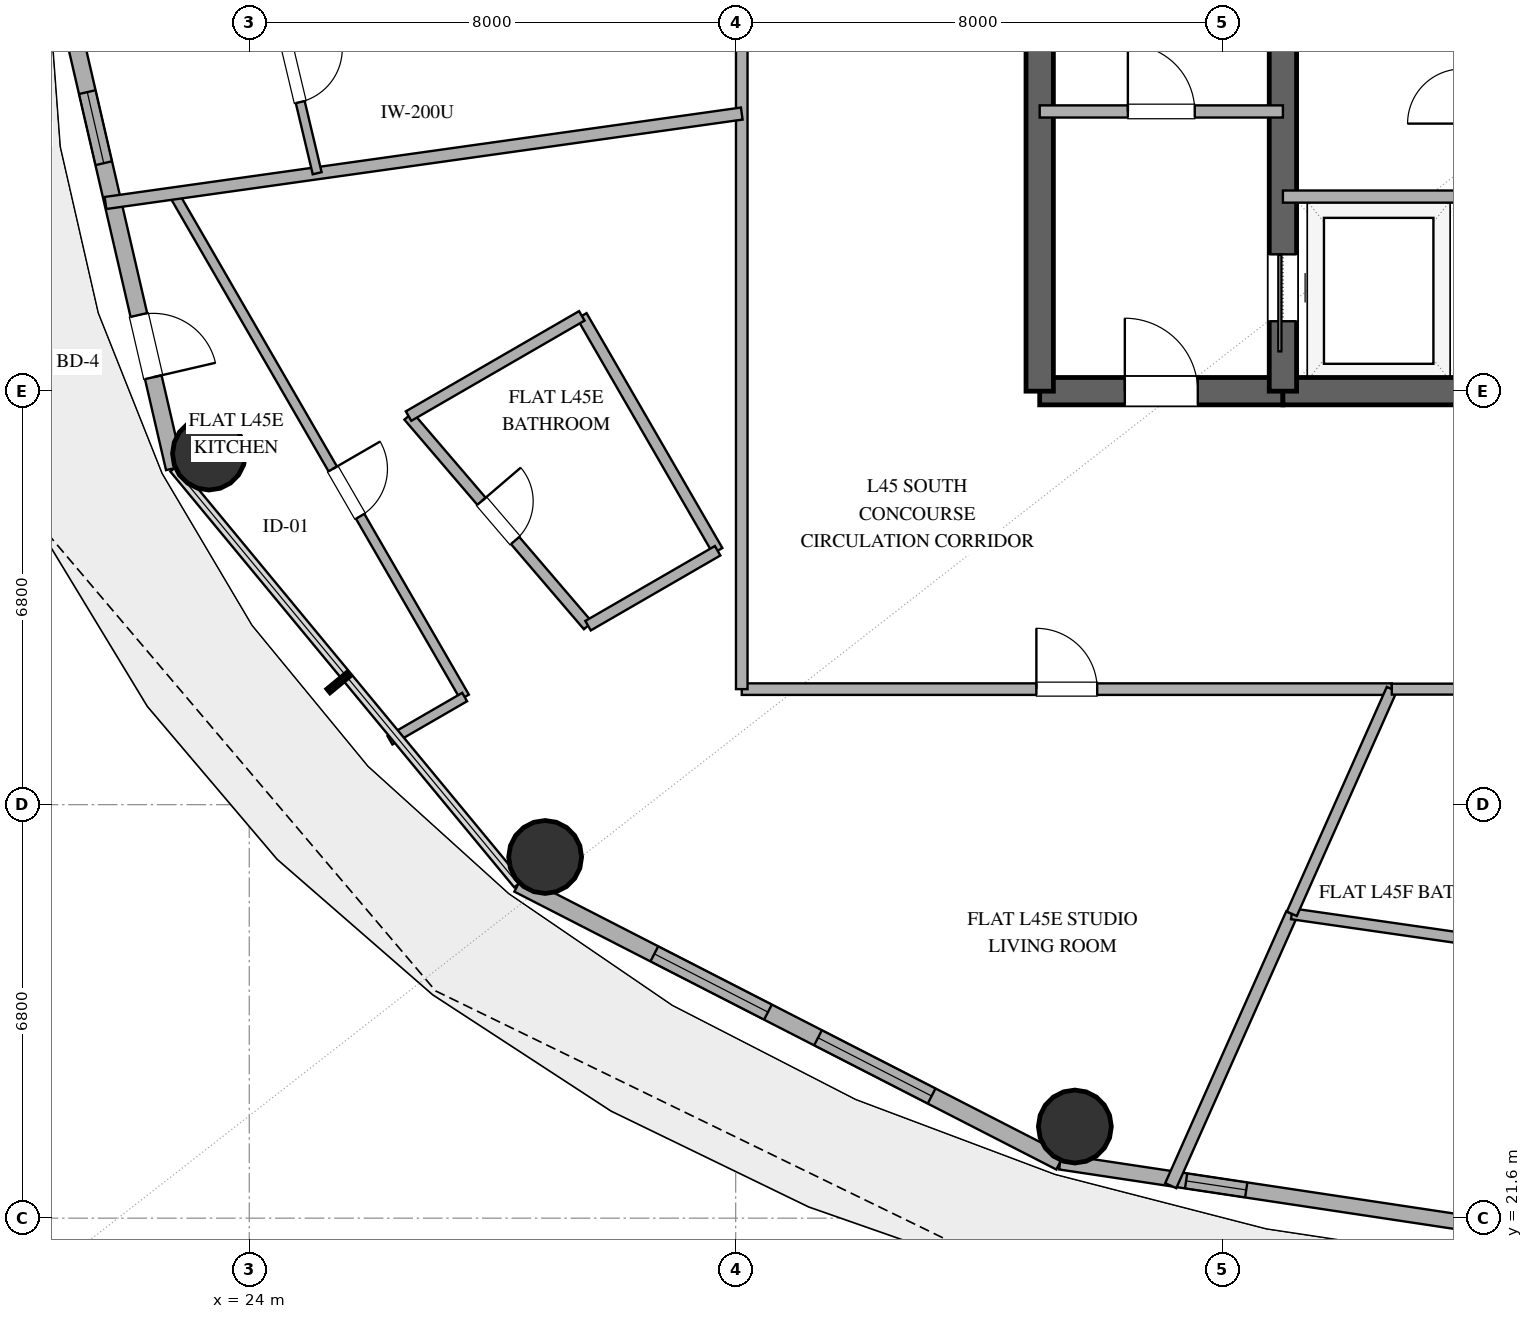
"""IFC4 building model, lengths in metres.
Left out: names, types, materials, properties, quantities, classifications, styles, units other than length and angle.
Written with IfcOpenShell. Run it as: python <this file> out.ifc"""

import sys

from ifc_helpers import new_model, si_unit, direction, frame, frame_2d, origin, origin_2d, place, context, subcontext, project, spatial, rectangle, hollow_circle, extrude, element, fill, save


model = new_model("IFC4")
c1 = context("Model", 3, precision=1e-05, world=origin(), true_north=direction((0.0, 1.0)))
c2 = subcontext(c1, "Body", "Model", "MODEL_VIEW")
j1 = project(units=[si_unit("LENGTHUNIT", "METRE"), si_unit("PLANEANGLEUNIT", "RADIAN")], contexts=[c1])
p1 = place(None, origin())
s1 = spatial("IfcSite", under=j1, at=p1, CompositionType="ELEMENT")
p2 = place(p1, origin())
s2 = spatial("IfcBuilding", under=s1, at=p2, CompositionType="ELEMENT")
p3 = place(p2, frame((0.0, 0.0, 179.4)))
s3 = spatial("IfcBuildingStorey", under=s2, at=p3, CompositionType="ELEMENT", Elevation=179.4)
p4 = place(p3, frame((37.0, 35.2, 0.0), z_axis=(0.0, 0.0, 1.0), x_axis=(1.0, 0.0, 0.0)))
e1 = element("IfcWall", 1, at=p4, inside=s3, PredefinedType="SHEAR", context=c2, shape_type="SweptSolid", body=[
    extrude(rectangle(XDim=4.0, YDim=0.45, at=frame_2d((2.0, 0.0))), origin(), (0.0, 0.0, 1.0), 3.38),
])
p5 = place(p4, frame((1.4, 0.0, 0.0)))
e2 = element("IfcOpeningElement", 2, at=p5, cuts=e1, PredefinedType="OPENING", context=c2, shape_type="SweptSolid", body=[
    extrude(rectangle(XDim=1.2, YDim=2.15, at=frame_2d((0.6, 1.075))), frame((0.0, 0.235, 0.0), z_axis=(0.0, -1.0, 0.0), x_axis=(1.0, 0.0, 0.0)), (0.0, 0.0, 1.0), 0.47),
])
p6 = place(p3, frame((41.0, 35.2, 0.0), z_axis=(0.0, 0.0, 1.0), x_axis=(1.0, 0.0, 0.0)))
e3 = element("IfcWall", 3, at=p6, inside=s3, PredefinedType="SHEAR", context=c2, shape_type="SweptSolid", body=[
    extrude(rectangle(XDim=14.0, YDim=0.45, at=frame_2d((7.0, 0.0))), origin(), (0.0, 0.0, 1.0), 3.38),
])
p7 = place(p6, frame((6.1, 0.0, 0.0)))
e4 = element("IfcOpeningElement", 4, at=p7, cuts=e3, PredefinedType="OPENING", context=c2, shape_type="SweptSolid", body=[
    extrude(rectangle(XDim=1.8, YDim=2.25, at=frame_2d((0.9, 1.125))), frame((0.0, 0.235, 0.0), z_axis=(0.0, -1.0, 0.0), x_axis=(1.0, 0.0, 0.0)), (0.0, 0.0, 1.0), 0.47),
])
p8 = place(p3, frame((37.0, 35.2, 0.0), z_axis=(0.0, 0.0, 1.0), x_axis=(0.0, 1.0, 0.0)))
e5 = element("IfcWall", 5, at=p8, inside=s3, PredefinedType="SHEAR", context=c2, shape_type="SweptSolid", body=[
    extrude(rectangle(XDim=13.6, YDim=0.45, at=frame_2d((6.8, 0.0))), origin(), (0.0, 0.0, 1.0), 3.38),
])
p9 = place(p3, frame((41.0, 35.2, 0.0), z_axis=(0.0, 0.0, 1.0), x_axis=(0.0, 1.0, 0.0)))
e6 = element("IfcWall", 6, at=p9, inside=s3, PredefinedType="SHEAR", context=c2, shape_type="SweptSolid", body=[
    extrude(rectangle(XDim=13.6, YDim=0.45, at=frame_2d((6.8, 0.0))), origin(), (0.0, 0.0, 1.0), 3.38),
])
p10 = place(p9, frame((1.15, 0.0, 0.0)))
e7 = element("IfcOpeningElement", 7, at=p10, cuts=e6, PredefinedType="OPENING", context=c2, shape_type="SweptSolid", body=[
    extrude(rectangle(XDim=1.1, YDim=2.2, at=frame_2d((0.55, 1.1))), frame((0.0, 0.235, 0.0), z_axis=(0.0, -1.0, 0.0), x_axis=(1.0, 0.0, 0.0)), (0.0, 0.0, 1.0), 0.47),
])
for number, where, z_axis, x_axis in (
    (8, (23.338, 34.174, 0.0), (0.0, 0.0, 1.0), (1.0, 0.0, 0.0)),
    (9, (28.866, 27.54, 0.0), (0.0, 0.0, 1.0), (1.0, 0.0, 0.0)),
    (10, (37.578, 23.107, 0.0), (0.0, 0.0, 1.0), (1.0, 0.0, 0.0)),
):
    element("IfcColumn", number, at=place(p3, frame(where, z_axis=z_axis, x_axis=x_axis)), inside=s3, PredefinedType="COLUMN", context=c2, shape_type="SweptSolid", body=[
        extrude(hollow_circle(Radius=0.6, WallThickness=0.032, at=origin_2d()), origin(), (0.0, 0.0, 1.0), 3.38),
    ])
p11 = place(p3, frame((20.901, 42.0, 0.0), z_axis=(0.0, 0.0, 1.0), x_axis=(0.225473184558, -0.974249374157, 0.0)))
e11 = element("IfcWall", 11, at=p11, inside=s3, PredefinedType="SOLIDWALL", context=c2, shape_type="SweptSolid", body=[
    extrude(rectangle(XDim=8.28, YDim=0.28, at=frame_2d((4.14, 0.0))), origin(), (0.0, 0.0, 1.0), 3.38),
])
p12 = place(p11, frame((1.932, 0.0, 0.85)))
e12 = element("IfcOpeningElement", 12, at=p12, cuts=e11, PredefinedType="OPENING", context=c2, shape_type="SweptSolid", body=[
    extrude(rectangle(XDim=1.2, YDim=1.8, at=frame_2d((0.6, 0.9))), frame((0.0, 0.15, 0.0), z_axis=(0.0, -1.0, 0.0), x_axis=(1.0, 0.0, 0.0)), (0.0, 0.0, 1.0), 0.3),
])
p13 = place(p11, frame((5.694, 0.0, 0.0)))
e13 = element("IfcOpeningElement", 13, at=p13, cuts=e11, PredefinedType="OPENING", context=c2, shape_type="SweptSolid", body=[
    extrude(rectangle(XDim=1.05, YDim=2.2, at=frame_2d((0.525, 1.1))), frame((0.0, 0.15, 0.0), z_axis=(0.0, -1.0, 0.0), x_axis=(1.0, 0.0, 0.0)), (0.0, 0.0, 1.0), 0.3),
])
p14 = place(p3, frame((28.424, 27.094, 0.0), z_axis=(0.0, 0.0, 1.0), x_axis=(0.889872523182, -0.456209263919, 0.0)))
e14 = element("IfcWall", 14, at=p14, inside=s3, PredefinedType="SOLIDWALL", context=c2, shape_type="SweptSolid", body=[
    extrude(rectangle(XDim=10.016, YDim=0.28, at=frame_2d((5.008, 0.0))), origin(), (0.0, 0.0, 1.0), 3.38),
])
p15 = place(p14, frame((2.515, 0.0, 0.85)))
e15 = element("IfcOpeningElement", 15, at=p15, cuts=e14, PredefinedType="OPENING", context=c2, shape_type="SweptSolid", body=[
    extrude(rectangle(XDim=2.1, YDim=2.2, at=frame_2d((1.05, 1.1))), frame((0.0, 0.15, 0.0), z_axis=(0.0, -1.0, 0.0), x_axis=(1.0, 0.0, 0.0)), (0.0, 0.0, 1.0), 0.3),
])
p16 = place(p14, frame((5.54, 0.0, 0.85)))
e16 = element("IfcOpeningElement", 16, at=p16, cuts=e14, PredefinedType="OPENING", context=c2, shape_type="SweptSolid", body=[
    extrude(rectangle(XDim=2.1, YDim=2.2, at=frame_2d((1.05, 1.1))), frame((0.0, 0.15, 0.0), z_axis=(0.0, -1.0, 0.0), x_axis=(1.0, 0.0, 0.0)), (0.0, 0.0, 1.0), 0.3),
])
p17 = place(p3, frame((37.337, 22.525, 0.0), z_axis=(0.0, 0.0, 1.0), x_axis=(0.988863993413, -0.148822049884, 0.0)))
e17 = element("IfcWall", 17, at=p17, inside=s3, PredefinedType="SOLIDWALL", context=c2, shape_type="SweptSolid", body=[
    extrude(rectangle(XDim=10.783, YDim=0.25, at=frame_2d((5.392, 0.0))), origin(), (0.0, 0.0, 1.0), 3.38),
])
p18 = place(p17, frame((2.094, 0.0, 0.35)))
e18 = element("IfcOpeningElement", 18, at=p18, cuts=e17, PredefinedType="OPENING", context=c2, shape_type="SweptSolid", body=[
    extrude(rectangle(XDim=1.0, YDim=1.05, at=frame_2d((0.5, 0.525))), frame((0.0, 0.135, 0.0), z_axis=(0.0, -1.0, 0.0), x_axis=(1.0, 0.0, 0.0)), (0.0, 0.0, 1.0), 0.27),
])
p19 = place(p3, frame((37.0, 39.8, 0.0), z_axis=(0.0, 0.0, 1.0), x_axis=(1.0, 0.0, 0.0)))
e19 = element("IfcWall", 19, at=p19, inside=s3, PredefinedType="SOLIDWALL", context=c2, shape_type="SweptSolid", body=[
    extrude(rectangle(XDim=4.0, YDim=0.2, at=frame_2d((2.0, 0.0))), origin(), (0.0, 0.0, 1.0), 2.74),
])
p20 = place(p19, frame((1.45, 0.0, 0.0)))
e20 = element("IfcOpeningElement", 20, at=p20, cuts=e19, PredefinedType="OPENING", context=c2, shape_type="SweptSolid", body=[
    extrude(rectangle(XDim=1.1, YDim=2.15, at=frame_2d((0.55, 1.075))), frame((0.0, 0.11, 0.0), z_axis=(0.0, -1.0, 0.0), x_axis=(1.0, 0.0, 0.0)), (0.0, 0.0, 1.0), 0.22),
])
p21 = place(p3, frame((41.0, 38.4, 0.0), z_axis=(0.0, 0.0, 1.0), x_axis=(1.0, 0.0, 0.0)))
e21 = element("IfcWall", 21, at=p21, inside=s3, PredefinedType="SOLIDWALL", context=c2, shape_type="SweptSolid", body=[
    extrude(rectangle(XDim=2.95, YDim=0.2, at=frame_2d((1.475, 0.0))), origin(), (0.0, 0.0, 1.0), 2.74),
])
p22 = place(p3, frame((32.1, 30.3, 0.0), z_axis=(0.0, 0.0, 1.0), x_axis=(1.0, 0.0, 0.0)))
e22 = element("IfcWall", 22, at=p22, inside=s3, PredefinedType="PARTITIONING", context=c2, shape_type="SweptSolid", body=[
    extrude(rectangle(XDim=10.691, YDim=0.19, at=frame_2d((5.345, 0.0))), origin(), (0.0, 0.0, 1.0), 2.74),
])
p23 = place(p22, frame((4.845, 0.0, 0.0)))
e23 = element("IfcOpeningElement", 23, at=p23, cuts=e22, PredefinedType="OPENING", context=c2, shape_type="SweptSolid", body=[
    extrude(rectangle(XDim=1.0, YDim=2.2, at=frame_2d((0.5, 1.1))), frame((0.0, 0.105, 0.0), z_axis=(0.0, -1.0, 0.0), x_axis=(1.0, 0.0, 0.0)), (0.0, 0.0, 1.0), 0.21),
])
p24 = place(p3, frame((22.753, 38.452, 0.0), z_axis=(0.0, 0.0, 1.0), x_axis=(0.500584533727, -0.865687659952, 0.0)))
e24 = element("IfcWall", 24, at=p24, inside=s3, PredefinedType="PLUMBINGWALL", context=c2, shape_type="SweptSolid", body=[
    extrude(rectangle(XDim=9.567, YDim=0.16, at=frame_2d((4.783, 0.0))), origin(), (0.0, 0.0, 1.0), 2.74),
])
p25 = place(p24, frame((5.233, 0.0, 0.0)))
e25 = element("IfcOpeningElement", 25, at=p25, cuts=e24, PredefinedType="OPENING", context=c2, shape_type="SweptSolid", body=[
    extrude(rectangle(XDim=0.9, YDim=2.1, at=frame_2d((0.45, 1.05))), frame((0.0, 0.09, 0.0), z_axis=(0.0, -1.0, 0.0), x_axis=(1.0, 0.0, 0.0)), (0.0, 0.0, 1.0), 0.18),
])
p26 = place(p3, frame((32.1, 46.593, 0.0), z_axis=(0.0, 0.0, 1.0), x_axis=(0.0, -1.0, 0.0)))
e26 = element("IfcWall", 26, at=p26, inside=s3, PredefinedType="PARTITIONING", context=c2, shape_type="SweptSolid", body=[
    extrude(rectangle(XDim=16.292, YDim=0.19, at=frame_2d((8.146, 0.0))), origin(), (0.0, 0.0, 1.0), 2.74),
])
p27 = place(p3, frame((21.635, 38.295, 0.0), z_axis=(0.0, 0.0, 1.0), x_axis=(0.990268074466, 0.139173060229, 0.0)))
e27 = element("IfcWall", 27, at=p27, inside=s3, PredefinedType="PARTITIONING", context=c2, shape_type="SweptSolid", body=[
    extrude(rectangle(XDim=10.567, YDim=0.2, at=frame_2d((5.284, 0.0))), origin(), (0.0, 0.0, 1.0), 2.74),
])
p28 = place(p3, frame((39.155, 22.134, 0.0), z_axis=(0.0, 0.0, 1.0), x_axis=(0.406740050792, 0.913543940422, 0.0)))
e28 = element("IfcWall", 28, at=p28, inside=s3, PredefinedType="PARTITIONING", context=c2, shape_type="SweptSolid", body=[
    extrude(rectangle(XDim=4.894, YDim=0.2, at=frame_2d((2.447, 0.0))), origin(), (0.0, 0.0, 1.0), 2.74),
])
p29 = place(p3, frame((26.62, 34.79, 0.0), z_axis=(0.0, 0.0, 1.0), x_axis=(0.650507788654, -0.759499583213, 0.0)))
e29 = element("IfcWall", 29, at=p29, inside=s3, PredefinedType="PLUMBINGWALL", context=c2, shape_type="SweptSolid", body=[
    extrude(rectangle(XDim=4.538, YDim=0.18, at=frame_2d((2.269, 0.0))), origin(), (0.0, 0.0, 1.0), 2.74),
])
p30 = place(p29, frame((1.844, 0.0, 0.0)))
e30 = element("IfcOpeningElement", 30, at=p30, cuts=e29, PredefinedType="OPENING", context=c2, shape_type="SweptSolid", body=[
    extrude(rectangle(XDim=0.85, YDim=2.1, at=frame_2d((0.425, 1.05))), frame((0.0, 0.1, 0.0), z_axis=(0.0, -1.0, 0.0), x_axis=(1.0, 0.0, 0.0)), (0.0, 0.0, 1.0), 0.2),
])
p31 = place(p3, frame((31.703, 32.576, 0.0), z_axis=(0.0, 0.0, 1.0), x_axis=(-0.500604830324, 0.865675923112, 0.0)))
e31 = element("IfcWall", 31, at=p31, inside=s3, PredefinedType="PLUMBINGWALL", context=c2, shape_type="SweptSolid", body=[
    extrude(rectangle(XDim=4.462, YDim=0.18, at=frame_2d((2.231, 0.0))), origin(), (0.0, 0.0, 1.0), 2.74),
])
p32 = place(p3, frame((45.366, 25.999, 0.0), z_axis=(0.0, 0.0, 1.0), x_axis=(-0.98982427769, 0.14229511339, 0.0)))
e32 = element("IfcWall", 32, at=p32, inside=s3, PredefinedType="PLUMBINGWALL", context=c2, shape_type="SweptSolid", body=[
    extrude(rectangle(XDim=4.264, YDim=0.18, at=frame_2d((2.132, 0.0))), origin(), (0.0, 0.0, 1.0), 2.74),
])
p33 = place(p3, frame((41.146, 26.605, 0.0), z_axis=(0.0, 0.0, 1.0), x_axis=(0.406732062562, 0.913547497005, 0.0)))
e33 = element("IfcWall", 33, at=p33, inside=s3, PredefinedType="PLUMBINGWALL", context=c2, shape_type="SweptSolid", body=[
    extrude(rectangle(XDim=4.044, YDim=0.18, at=frame_2d((2.022, 0.0))), origin(), (0.0, 0.0, 1.0), 2.74),
])
p34 = place(p3, frame((24.351, 42.0, 0.0), z_axis=(0.0, 0.0, 1.0), x_axis=(0.231590575549, -0.972813345569, 0.0)))
e34 = element("IfcWall", 34, at=p34, inside=s3, PredefinedType="PARTITIONING", context=c2, shape_type="SweptSolid", body=[
    extrude(rectangle(XDim=3.306, YDim=0.15, at=frame_2d((1.653, 0.0))), origin(), (0.0, 0.0, 1.0), 2.74),
])
p35 = place(p34, frame((1.203, 0.0, 0.0)))
e35 = element("IfcOpeningElement", 35, at=p35, cuts=e34, PredefinedType="OPENING", context=c2, shape_type="SweptSolid", body=[
    extrude(rectangle(XDim=0.9, YDim=2.1, at=frame_2d((0.45, 1.05))), frame((0.0, 0.085, 0.0), z_axis=(0.0, -1.0, 0.0), x_axis=(1.0, 0.0, 0.0)), (0.0, 0.0, 1.0), 0.17),
])
p36 = place(p3, frame((29.469, 36.438, 0.0), z_axis=(0.0, 0.0, 1.0), x_axis=(-0.86566653326, -0.500621067469, 0.0)))
e36 = element("IfcWall", 36, at=p36, inside=s3, PredefinedType="PLUMBINGWALL", context=c2, shape_type="SweptSolid", body=[
    extrude(rectangle(XDim=3.292, YDim=0.18, at=frame_2d((1.646, 0.0))), origin(), (0.0, 0.0, 1.0), 2.74),
])
p37 = place(p3, frame((29.572, 31.344, 0.0), z_axis=(0.0, 0.0, 1.0), x_axis=(0.865711329059, 0.500543599239, 0.0)))
e37 = element("IfcWall", 37, at=p37, inside=s3, PredefinedType="PLUMBINGWALL", context=c2, shape_type="SweptSolid", body=[
    extrude(rectangle(XDim=2.462, YDim=0.18, at=frame_2d((1.231, 0.0))), origin(), (0.0, 0.0, 1.0), 2.74),
])
p38 = place(p3, frame((42.791, 30.3, 0.0), z_axis=(0.0, 0.0, 1.0), x_axis=(1.0, 0.0, 0.0)))
e38 = element("IfcWall", 38, at=p38, inside=s3, PredefinedType="PLUMBINGWALL", context=c2, shape_type="SweptSolid", body=[
    extrude(rectangle(XDim=2.082, YDim=0.18, at=frame_2d((1.041, 0.0))), origin(), (0.0, 0.0, 1.0), 2.74),
])
p39 = place(p3, frame((27.542, 30.17, 0.0), z_axis=(0.0, 0.0, 1.0), x_axis=(-0.865626475351, -0.500690328617, 0.0)))
e39 = element("IfcWall", 39, at=p39, inside=s3, PredefinedType="PLUMBINGWALL", context=c2, shape_type="SweptSolid", body=[
    extrude(rectangle(XDim=1.419, YDim=0.16, at=frame_2d((0.709, 0.0))), origin(), (0.0, 0.0, 1.0), 2.74),
])
p40 = place(p12, origin())
e40 = element("IfcWindow", 40, at=p40, inside=s3, PartitioningType="SINGLE_PANEL", PredefinedType="WINDOW", context=c2, shape_type="SweptSolid", body=[
    extrude(rectangle(XDim=1.2, YDim=1.8, at=frame_2d((0.6, 0.9))), frame((0.0, 0.03, 0.0), z_axis=(0.0, -1.0, 0.0), x_axis=(1.0, 0.0, 0.0)), (0.0, 0.0, 1.0), 0.06),
])
fill(e12, e40)
p41 = place(p13, origin())
e41 = element("IfcDoor", 41, at=p41, inside=s3, OperationType="SINGLE_SWING_RIGHT", PredefinedType="DOOR", context=c2, shape_type="SweptSolid", body=[
    extrude(rectangle(XDim=1.05, YDim=2.2, at=frame_2d((0.525, 1.1))), frame((0.0, 0.025, 0.0), z_axis=(0.0, -1.0, 0.0), x_axis=(1.0, 0.0, 0.0)), (0.0, 0.0, 1.0), 0.05),
])
fill(e13, e41)
p42 = place(p15, origin())
e42 = element("IfcWindow", 42, at=p42, inside=s3, PartitioningType="SINGLE_PANEL", PredefinedType="WINDOW", context=c2, shape_type="SweptSolid", body=[
    extrude(rectangle(XDim=2.1, YDim=2.2, at=frame_2d((1.05, 1.1))), frame((0.0, 0.03, 0.0), z_axis=(0.0, -1.0, 0.0), x_axis=(1.0, 0.0, 0.0)), (0.0, 0.0, 1.0), 0.06),
])
fill(e15, e42)
p43 = place(p16, origin())
e43 = element("IfcWindow", 43, at=p43, inside=s3, PartitioningType="SINGLE_PANEL", PredefinedType="WINDOW", context=c2, shape_type="SweptSolid", body=[
    extrude(rectangle(XDim=2.1, YDim=2.2, at=frame_2d((1.05, 1.1))), frame((0.0, 0.03, 0.0), z_axis=(0.0, -1.0, 0.0), x_axis=(1.0, 0.0, 0.0)), (0.0, 0.0, 1.0), 0.06),
])
fill(e16, e43)
p44 = place(p18, origin())
e44 = element("IfcWindow", 44, at=p44, inside=s3, PartitioningType="SINGLE_PANEL", PredefinedType="WINDOW", context=c2, shape_type="SweptSolid", body=[
    extrude(rectangle(XDim=1.0, YDim=1.05, at=frame_2d((0.5, 0.525))), frame((0.0, 0.03, 0.0), z_axis=(0.0, -1.0, 0.0), x_axis=(1.0, 0.0, 0.0)), (0.0, 0.0, 1.0), 0.06),
])
fill(e18, e44)
p45 = place(p10, origin())
e45 = element("IfcDoor", 45, at=p45, inside=s3, OperationType="SLIDING_TO_LEFT", PredefinedType="DOOR", context=c2, shape_type="SweptSolid", body=[
    extrude(rectangle(XDim=1.1, YDim=2.2, at=frame_2d((0.55, 1.1))), frame((0.0, 0.025, 0.0), z_axis=(0.0, -1.0, 0.0), x_axis=(1.0, 0.0, 0.0)), (0.0, 0.0, 1.0), 0.05),
])
fill(e7, e45)
p46 = place(p5, origin())
e46 = element("IfcDoor", 46, at=p46, inside=s3, OperationType="SINGLE_SWING_LEFT", PredefinedType="DOOR", context=c2, shape_type="SweptSolid", body=[
    extrude(rectangle(XDim=1.2, YDim=2.15, at=frame_2d((0.6, 1.075))), frame((0.0, 0.025, 0.0), z_axis=(0.0, -1.0, 0.0), x_axis=(1.0, 0.0, 0.0)), (0.0, 0.0, 1.0), 0.05),
])
fill(e2, e46)
p47 = place(p20, origin())
e47 = element("IfcDoor", 47, at=p47, inside=s3, OperationType="SINGLE_SWING_LEFT", PredefinedType="DOOR", context=c2, shape_type="SweptSolid", body=[
    extrude(rectangle(XDim=1.1, YDim=2.15, at=frame_2d((0.55, 1.075))), frame((0.0, 0.025, 0.0), z_axis=(0.0, -1.0, 0.0), x_axis=(1.0, 0.0, 0.0)), (0.0, 0.0, 1.0), 0.05),
])
fill(e20, e47)
p48 = place(p23, origin())
e48 = element("IfcDoor", 48, at=p48, inside=s3, OperationType="SINGLE_SWING_LEFT", PredefinedType="DOOR", context=c2, shape_type="SweptSolid", body=[
    extrude(rectangle(XDim=1.0, YDim=2.2, at=frame_2d((0.5, 1.1))), frame((0.0, 0.025, 0.0), z_axis=(0.0, -1.0, 0.0), x_axis=(1.0, 0.0, 0.0)), (0.0, 0.0, 1.0), 0.05),
])
fill(e23, e48)
p49 = place(p25, origin())
e49 = element("IfcDoor", 49, at=p49, inside=s3, OperationType="SINGLE_SWING_LEFT", PredefinedType="DOOR", context=c2, shape_type="SweptSolid", body=[
    extrude(rectangle(XDim=0.9, YDim=2.1, at=frame_2d((0.45, 1.05))), frame((0.0, 0.025, 0.0), z_axis=(0.0, -1.0, 0.0), x_axis=(1.0, 0.0, 0.0)), (0.0, 0.0, 1.0), 0.05),
])
fill(e25, e49)
p50 = place(p30, origin())
e50 = element("IfcDoor", 50, at=p50, inside=s3, OperationType="SINGLE_SWING_LEFT", PredefinedType="DOOR", context=c2, shape_type="SweptSolid", body=[
    extrude(rectangle(XDim=0.85, YDim=2.1, at=frame_2d((0.425, 1.05))), frame((0.0, 0.025, 0.0), z_axis=(0.0, -1.0, 0.0), x_axis=(1.0, 0.0, 0.0)), (0.0, 0.0, 1.0), 0.05),
])
fill(e30, e50)
p51 = place(p35, origin())
e51 = element("IfcDoor", 51, at=p51, inside=s3, OperationType="SINGLE_SWING_LEFT", PredefinedType="DOOR", context=c2, shape_type="SweptSolid", body=[
    extrude(rectangle(XDim=0.9, YDim=2.1, at=frame_2d((0.45, 1.05))), frame((0.0, 0.025, 0.0), z_axis=(0.0, -1.0, 0.0), x_axis=(1.0, 0.0, 0.0)), (0.0, 0.0, 1.0), 0.05),
])
fill(e35, e51)
save(model, sys.argv[1])
